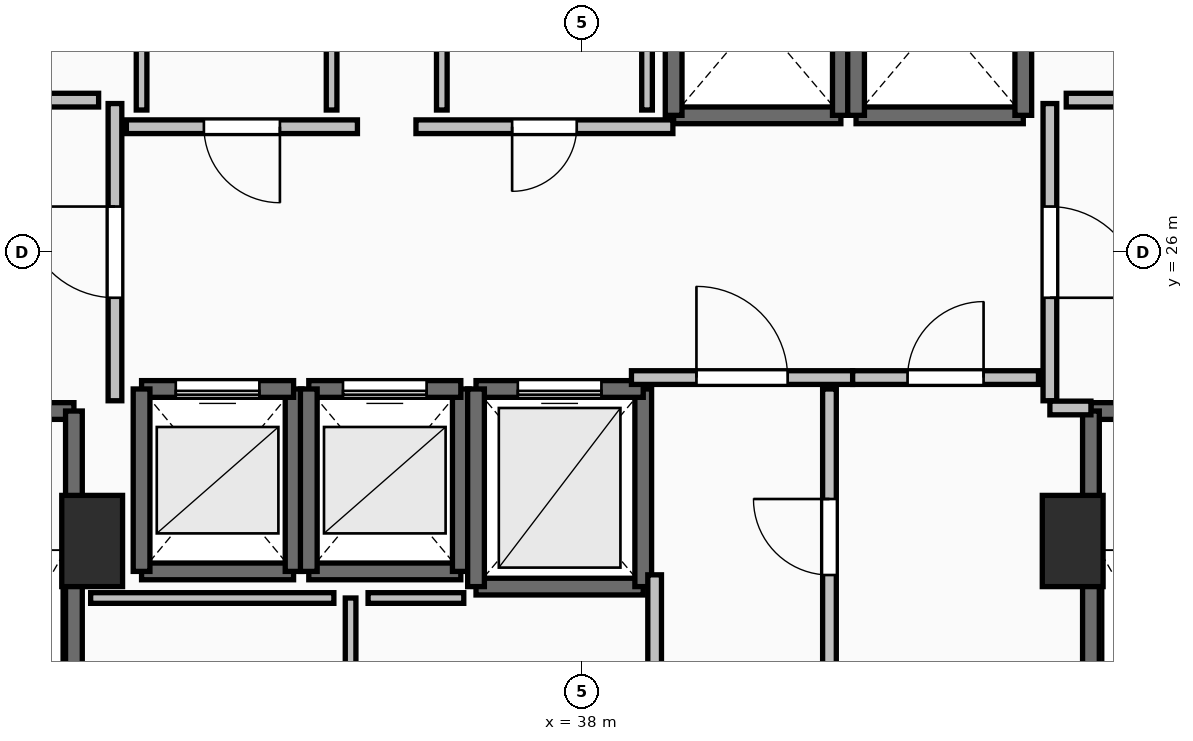
"""IFC4 building model, lengths in metres.
Left out: names, types, materials, properties, quantities, classifications, styles, units other than length and angle.
Written with IfcOpenShell. Run it as: python <this file> out.ifc"""

import sys

from ifc_helpers import new_model, si_unit, direction, frame, frame_2d, origin, origin_2d, place, context, subcontext, project, spatial, rectangle, extrude, element, fill, save


model = new_model("IFC4")
c1 = context("Model", 3, precision=1e-05, world=origin(), true_north=direction((0.0, 1.0)))
c2 = subcontext(c1, "Body", "Model", "MODEL_VIEW")
j1 = project(units=[si_unit("LENGTHUNIT", "METRE"), si_unit("PLANEANGLEUNIT", "RADIAN")], contexts=[c1])
p1 = place(None, origin())
s1 = spatial("IfcSite", under=j1, at=p1, CompositionType="ELEMENT")
p2 = place(p1, origin())
s2 = spatial("IfcBuilding", under=s1, at=p2, CompositionType="ELEMENT")
p3 = place(p2, frame((0.0, 0.0, 157.1)))
s3 = spatial("IfcBuildingStorey", under=s2, at=p3, CompositionType="ELEMENT", Elevation=157.1)
for number, where, z_axis, x_axis in (
    (1, (31.55, 22.2, 0.0), (0.0, 0.0, 1.0), (1.0, 0.0, 0.0)),
    (2, (44.45, 22.2, 0.0), (0.0, 0.0, 1.0), (1.0, 0.0, 0.0)),
):
    element("IfcColumn", number, at=place(p3, frame(where, z_axis=z_axis, x_axis=x_axis)), inside=s3, PredefinedType="PILASTER", context=c2, shape_type="SweptSolid", body=[
        extrude(rectangle(XDim=0.8, YDim=1.2, at=origin_2d()), origin(), (0.0, 0.0, 1.0), 3.5),
    ])
p4 = place(p3, frame((27.94, 23.91, 0.0), z_axis=(0.0, 0.0, 1.0), x_axis=(1.0, 0.0, 0.0)))
e3 = element("IfcWall", 3, at=p4, inside=s3, PredefinedType="SOLIDWALL", context=c2, shape_type="SweptSolid", body=[
    extrude(rectangle(XDim=3.37, YDim=0.22, at=frame_2d((1.685, 0.0))), origin(), (0.0, 0.0, 1.0), 3.24),
])
p5 = place(p4, frame((1.135, 0.0, 0.0)))
e4 = element("IfcOpeningElement", 4, at=p5, cuts=e3, PredefinedType="OPENING", context=c2, shape_type="SweptSolid", body=[
    extrude(rectangle(XDim=1.1, YDim=2.15, at=frame_2d((0.55, 1.075))), frame((0.0, 0.125, 0.0), z_axis=(0.0, -1.0, 0.0), x_axis=(1.0, 0.0, 0.0)), (0.0, 0.0, 1.0), 0.25),
])
p6 = place(p3, frame((31.31, 23.91, 0.0), z_axis=(0.0, 0.0, 1.0), x_axis=(0.0, -1.0, 0.0)))
e5 = element("IfcWall", 5, at=p6, inside=s3, PredefinedType="SOLIDWALL", context=c2, shape_type="SweptSolid", body=[
    extrude(rectangle(XDim=7.42, YDim=0.22, at=frame_2d((3.71, 0.0))), origin(), (0.0, 0.0, 1.0), 3.24),
])
p7 = place(p3, frame((44.69, 23.91, 0.0), z_axis=(0.0, 0.0, 1.0), x_axis=(1.0, 0.0, 0.0)))
e6 = element("IfcWall", 6, at=p7, inside=s3, PredefinedType="SOLIDWALL", context=c2, shape_type="SweptSolid", body=[
    extrude(rectangle(XDim=3.37, YDim=0.22, at=frame_2d((1.685, 0.0))), origin(), (0.0, 0.0, 1.0), 3.24),
])
p8 = place(p7, frame((1.135, 0.0, 0.0)))
e7 = element("IfcOpeningElement", 7, at=p8, cuts=e6, PredefinedType="OPENING", context=c2, shape_type="SweptSolid", body=[
    extrude(rectangle(XDim=1.1, YDim=2.15, at=frame_2d((0.55, 1.075))), frame((0.0, 0.125, 0.0), z_axis=(0.0, -1.0, 0.0), x_axis=(1.0, 0.0, 0.0)), (0.0, 0.0, 1.0), 0.25),
])
p9 = place(p3, frame((44.69, 16.49, 0.0), z_axis=(0.0, 0.0, 1.0), x_axis=(0.0, 1.0, 0.0)))
e8 = element("IfcWall", 8, at=p9, inside=s3, PredefinedType="SOLIDWALL", context=c2, shape_type="SweptSolid", body=[
    extrude(rectangle(XDim=7.42, YDim=0.22, at=frame_2d((3.71, 0.0))), origin(), (0.0, 0.0, 1.0), 3.24),
])
p10 = place(p3, frame((32.2, 21.8, 0.0), z_axis=(0.0, 0.0, 1.0), x_axis=(1.0, 0.0, 0.0)))
e9 = element("IfcWall", 9, at=p10, inside=s3, PredefinedType="SOLIDWALL", context=c2, shape_type="SweptSolid", body=[
    extrude(rectangle(XDim=2.0, YDim=0.22, at=frame_2d((1.0, 0.0))), origin(), (0.0, 0.0, 1.0), 3.24),
])
p11 = place(p3, frame((34.2, 21.8, 0.0), z_axis=(0.0, 0.0, 1.0), x_axis=(0.0, 1.0, 0.0)))
e10 = element("IfcWall", 10, at=p11, inside=s3, PredefinedType="SOLIDWALL", context=c2, shape_type="SweptSolid", body=[
    extrude(rectangle(XDim=2.4, YDim=0.22, at=frame_2d((1.2, 0.0))), origin(), (0.0, 0.0, 1.0), 3.24),
])
p12 = place(p3, frame((34.2, 24.2, 0.0), z_axis=(0.0, 0.0, 1.0), x_axis=(-1.0, 0.0, 0.0)))
e11 = element("IfcWall", 11, at=p12, inside=s3, PredefinedType="SOLIDWALL", context=c2, shape_type="SweptSolid", body=[
    extrude(rectangle(XDim=2.0, YDim=0.22, at=frame_2d((1.0, 0.0))), origin(), (0.0, 0.0, 1.0), 3.24),
])
p13 = place(p12, frame((0.45, 0.0, 0.0)))
e12 = element("IfcOpeningElement", 12, at=p13, cuts=e11, PredefinedType="OPENING", context=c2, shape_type="SweptSolid", body=[
    extrude(rectangle(XDim=1.1, YDim=2.2, at=frame_2d((0.55, 1.1))), frame((0.0, 0.125, 0.0), z_axis=(0.0, -1.0, 0.0), x_axis=(1.0, 0.0, 0.0)), (0.0, 0.0, 1.0), 0.25),
])
p14 = place(p3, frame((32.2, 24.2, 0.0), z_axis=(0.0, 0.0, 1.0), x_axis=(0.0, -1.0, 0.0)))
e13 = element("IfcWall", 13, at=p14, inside=s3, PredefinedType="SOLIDWALL", context=c2, shape_type="SweptSolid", body=[
    extrude(rectangle(XDim=2.4, YDim=0.22, at=frame_2d((1.2, 0.0))), origin(), (0.0, 0.0, 1.0), 3.24),
])
p15 = place(p3, frame((34.4, 21.8, 0.0), z_axis=(0.0, 0.0, 1.0), x_axis=(1.0, 0.0, 0.0)))
e14 = element("IfcWall", 14, at=p15, inside=s3, PredefinedType="SOLIDWALL", context=c2, shape_type="SweptSolid", body=[
    extrude(rectangle(XDim=2.0, YDim=0.22, at=frame_2d((1.0, 0.0))), origin(), (0.0, 0.0, 1.0), 3.24),
])
p16 = place(p3, frame((36.4, 21.8, 0.0), z_axis=(0.0, 0.0, 1.0), x_axis=(0.0, 1.0, 0.0)))
e15 = element("IfcWall", 15, at=p16, inside=s3, PredefinedType="SOLIDWALL", context=c2, shape_type="SweptSolid", body=[
    extrude(rectangle(XDim=2.4, YDim=0.22, at=frame_2d((1.2, 0.0))), origin(), (0.0, 0.0, 1.0), 3.24),
])
p17 = place(p3, frame((36.4, 24.2, 0.0), z_axis=(0.0, 0.0, 1.0), x_axis=(-1.0, 0.0, 0.0)))
e16 = element("IfcWall", 16, at=p17, inside=s3, PredefinedType="SOLIDWALL", context=c2, shape_type="SweptSolid", body=[
    extrude(rectangle(XDim=2.0, YDim=0.22, at=frame_2d((1.0, 0.0))), origin(), (0.0, 0.0, 1.0), 3.24),
])
p18 = place(p17, frame((0.45, 0.0, 0.0)))
e17 = element("IfcOpeningElement", 17, at=p18, cuts=e16, PredefinedType="OPENING", context=c2, shape_type="SweptSolid", body=[
    extrude(rectangle(XDim=1.1, YDim=2.2, at=frame_2d((0.55, 1.1))), frame((0.0, 0.125, 0.0), z_axis=(0.0, -1.0, 0.0), x_axis=(1.0, 0.0, 0.0)), (0.0, 0.0, 1.0), 0.25),
])
p19 = place(p3, frame((34.4, 24.2, 0.0), z_axis=(0.0, 0.0, 1.0), x_axis=(0.0, -1.0, 0.0)))
e18 = element("IfcWall", 18, at=p19, inside=s3, PredefinedType="SOLIDWALL", context=c2, shape_type="SweptSolid", body=[
    extrude(rectangle(XDim=2.4, YDim=0.22, at=frame_2d((1.2, 0.0))), origin(), (0.0, 0.0, 1.0), 3.24),
])
p20 = place(p3, frame((36.6, 21.6, 0.0), z_axis=(0.0, 0.0, 1.0), x_axis=(1.0, 0.0, 0.0)))
e19 = element("IfcWall", 19, at=p20, inside=s3, PredefinedType="SOLIDWALL", context=c2, shape_type="SweptSolid", body=[
    extrude(rectangle(XDim=2.2, YDim=0.22, at=frame_2d((1.1, 0.0))), origin(), (0.0, 0.0, 1.0), 3.24),
])
p21 = place(p3, frame((38.8, 21.6, 0.0), z_axis=(0.0, 0.0, 1.0), x_axis=(0.0, 1.0, 0.0)))
e20 = element("IfcWall", 20, at=p21, inside=s3, PredefinedType="SOLIDWALL", context=c2, shape_type="SweptSolid", body=[
    extrude(rectangle(XDim=2.6, YDim=0.22, at=frame_2d((1.3, 0.0))), origin(), (0.0, 0.0, 1.0), 3.24),
])
p22 = place(p3, frame((38.8, 24.2, 0.0), z_axis=(0.0, 0.0, 1.0), x_axis=(-1.0, 0.0, 0.0)))
e21 = element("IfcWall", 21, at=p22, inside=s3, PredefinedType="SOLIDWALL", context=c2, shape_type="SweptSolid", body=[
    extrude(rectangle(XDim=2.2, YDim=0.22, at=frame_2d((1.1, 0.0))), origin(), (0.0, 0.0, 1.0), 3.24),
])
p23 = place(p22, frame((0.55, 0.0, 0.0)))
e22 = element("IfcOpeningElement", 22, at=p23, cuts=e21, PredefinedType="OPENING", context=c2, shape_type="SweptSolid", body=[
    extrude(rectangle(XDim=1.1, YDim=2.2, at=frame_2d((0.55, 1.1))), frame((0.0, 0.125, 0.0), z_axis=(0.0, -1.0, 0.0), x_axis=(1.0, 0.0, 0.0)), (0.0, 0.0, 1.0), 0.25),
])
p24 = place(p3, frame((36.6, 24.2, 0.0), z_axis=(0.0, 0.0, 1.0), x_axis=(0.0, -1.0, 0.0)))
e23 = element("IfcWall", 23, at=p24, inside=s3, PredefinedType="SOLIDWALL", context=c2, shape_type="SweptSolid", body=[
    extrude(rectangle(XDim=2.6, YDim=0.22, at=frame_2d((1.3, 0.0))), origin(), (0.0, 0.0, 1.0), 3.24),
])
p25 = place(p3, frame((39.2, 27.8, 0.0), z_axis=(0.0, 0.0, 1.0), x_axis=(1.0, 0.0, 0.0)))
e24 = element("IfcWall", 24, at=p25, inside=s3, PredefinedType="SOLIDWALL", context=c2, shape_type="SweptSolid", body=[
    extrude(rectangle(XDim=2.2, YDim=0.22, at=frame_2d((1.1, 0.0))), origin(), (0.0, 0.0, 1.0), 3.24),
])
for number, where, z_axis, x_axis in (
    (25, (41.4, 27.8, 0.0), (0.0, 0.0, 1.0), (0.0, 1.0, 0.0)),
    (26, (39.2, 30.4, 0.0), (0.0, 0.0, 1.0), (0.0, -1.0, 0.0)),
):
    element("IfcWall", number, at=place(p3, frame(where, z_axis=z_axis, x_axis=x_axis)), inside=s3, PredefinedType="SOLIDWALL", context=c2, shape_type="SweptSolid", body=[
        extrude(rectangle(XDim=2.6, YDim=0.22, at=frame_2d((1.3, 0.0))), origin(), (0.0, 0.0, 1.0), 3.24),
    ])
p26 = place(p3, frame((41.6, 27.8, 0.0), z_axis=(0.0, 0.0, 1.0), x_axis=(1.0, 0.0, 0.0)))
e27 = element("IfcWall", 27, at=p26, inside=s3, PredefinedType="SOLIDWALL", context=c2, shape_type="SweptSolid", body=[
    extrude(rectangle(XDim=2.2, YDim=0.22, at=frame_2d((1.1, 0.0))), origin(), (0.0, 0.0, 1.0), 3.24),
])
for number, where, z_axis, x_axis in (
    (28, (43.8, 27.8, 0.0), (0.0, 0.0, 1.0), (0.0, 1.0, 0.0)),
    (29, (41.6, 30.4, 0.0), (0.0, 0.0, 1.0), (0.0, -1.0, 0.0)),
):
    element("IfcWall", number, at=place(p3, frame(where, z_axis=z_axis, x_axis=x_axis)), inside=s3, PredefinedType="SOLIDWALL", context=c2, shape_type="SweptSolid", body=[
        extrude(rectangle(XDim=2.6, YDim=0.22, at=frame_2d((1.3, 0.0))), origin(), (0.0, 0.0, 1.0), 3.24),
    ])
p27 = place(p3, frame((31.85, 24.045, 0.0), z_axis=(0.0, 0.0, 1.0), x_axis=(0.0, 1.0, 0.0)))
e30 = element("IfcWall", 30, at=p27, inside=s3, PredefinedType="PARTITIONING", context=c2, shape_type="SweptSolid", body=[
    extrude(rectangle(XDim=3.91, YDim=0.18, at=frame_2d((1.955, 0.0))), origin(), (0.0, 0.0, 1.0), 3.24),
])
p28 = place(p27, frame((1.355, 0.0, 0.0)))
e31 = element("IfcOpeningElement", 31, at=p28, cuts=e30, PredefinedType="OPENING", context=c2, shape_type="SweptSolid", body=[
    extrude(rectangle(XDim=1.2, YDim=2.15, at=frame_2d((0.6, 1.075))), frame((0.0, 0.105, 0.0), z_axis=(0.0, -1.0, 0.0), x_axis=(1.0, 0.0, 0.0)), (0.0, 0.0, 1.0), 0.21),
])
p29 = place(p3, frame((44.15, 27.955, 0.0), z_axis=(0.0, 0.0, 1.0), x_axis=(0.0, -1.0, 0.0)))
e32 = element("IfcWall", 32, at=p29, inside=s3, PredefinedType="PARTITIONING", context=c2, shape_type="SweptSolid", body=[
    extrude(rectangle(XDim=3.91, YDim=0.18, at=frame_2d((1.955, 0.0))), origin(), (0.0, 0.0, 1.0), 3.24),
])
p30 = place(p29, frame((1.355, 0.0, 0.0)))
e33 = element("IfcOpeningElement", 33, at=p30, cuts=e32, PredefinedType="OPENING", context=c2, shape_type="SweptSolid", body=[
    extrude(rectangle(XDim=1.2, YDim=2.15, at=frame_2d((0.6, 1.075))), frame((0.0, 0.105, 0.0), z_axis=(0.0, -1.0, 0.0), x_axis=(1.0, 0.0, 0.0)), (0.0, 0.0, 1.0), 0.21),
])
p31 = place(p3, frame((44.15, 23.95, 0.0), z_axis=(0.0, 0.0, 1.0), x_axis=(1.0, 0.0, 0.0)))
e34 = element("IfcWall", 34, at=p31, inside=s3, PredefinedType="PARTITIONING", context=c2, shape_type="SweptSolid", body=[
    extrude(rectangle(XDim=0.54, YDim=0.18, at=frame_2d((0.27, 0.0))), origin(), (0.0, 0.0, 1.0), 3.24),
])
p32 = place(p3, frame((38.645, 24.35, 0.0), z_axis=(0.0, 0.0, 1.0), x_axis=(1.0, 0.0, 0.0)))
e35 = element("IfcWall", 35, at=p32, inside=s3, PredefinedType="PARTITIONING", context=c2, shape_type="SweptSolid", body=[
    extrude(rectangle(XDim=2.91, YDim=0.18, at=frame_2d((1.455, 0.0))), origin(), (0.0, 0.0, 1.0), 3.24),
])
p33 = place(p32, frame((0.855, 0.0, 0.0)))
e36 = element("IfcOpeningElement", 36, at=p33, cuts=e35, PredefinedType="OPENING", context=c2, shape_type="SweptSolid", body=[
    extrude(rectangle(XDim=1.2, YDim=2.15, at=frame_2d((0.6, 1.075))), frame((0.0, 0.105, 0.0), z_axis=(0.0, -1.0, 0.0), x_axis=(1.0, 0.0, 0.0)), (0.0, 0.0, 1.0), 0.21),
])
p34 = place(p3, frame((41.555, 24.35, 0.0), z_axis=(0.0, 0.0, 1.0), x_axis=(1.0, 0.0, 0.0)))
e37 = element("IfcWall", 37, at=p34, inside=s3, PredefinedType="PARTITIONING", context=c2, shape_type="SweptSolid", body=[
    extrude(rectangle(XDim=2.445, YDim=0.18, at=frame_2d((1.223, 0.0))), origin(), (0.0, 0.0, 1.0), 3.24),
])
p35 = place(p34, frame((0.722, 0.0, 0.0)))
e38 = element("IfcOpeningElement", 38, at=p35, cuts=e37, PredefinedType="OPENING", context=c2, shape_type="SweptSolid", body=[
    extrude(rectangle(XDim=1.0, YDim=2.15, at=frame_2d((0.5, 1.075))), frame((0.0, 0.105, 0.0), z_axis=(0.0, -1.0, 0.0), x_axis=(1.0, 0.0, 0.0)), (0.0, 0.0, 1.0), 0.21),
])
p36 = place(p3, frame((35.04, 27.65, 0.0), z_axis=(0.0, 0.0, 1.0), x_axis=(-1.0, 0.0, 0.0)))
e39 = element("IfcWall", 39, at=p36, inside=s3, PredefinedType="PARTITIONING", context=c2, shape_type="SweptSolid", body=[
    extrude(rectangle(XDim=3.04, YDim=0.18, at=frame_2d((1.52, 0.0))), origin(), (0.0, 0.0, 1.0), 3.24),
])
p37 = place(p36, frame((1.02, 0.0, 0.0)))
e40 = element("IfcOpeningElement", 40, at=p37, cuts=e39, PredefinedType="OPENING", context=c2, shape_type="SweptSolid", body=[
    extrude(rectangle(XDim=1.0, YDim=2.15, at=frame_2d((0.5, 1.075))), frame((0.0, 0.105, 0.0), z_axis=(0.0, -1.0, 0.0), x_axis=(1.0, 0.0, 0.0)), (0.0, 0.0, 1.0), 0.21),
])
p38 = place(p3, frame((39.19, 27.65, 0.0), z_axis=(0.0, 0.0, 1.0), x_axis=(-1.0, 0.0, 0.0)))
e41 = element("IfcWall", 41, at=p38, inside=s3, PredefinedType="PARTITIONING", context=c2, shape_type="SweptSolid", body=[
    extrude(rectangle(XDim=3.38, YDim=0.18, at=frame_2d((1.69, 0.0))), origin(), (0.0, 0.0, 1.0), 3.24),
])
p39 = place(p38, frame((1.265, 0.0, 0.0)))
e42 = element("IfcOpeningElement", 42, at=p39, cuts=e41, PredefinedType="OPENING", context=c2, shape_type="SweptSolid", body=[
    extrude(rectangle(XDim=0.85, YDim=2.1, at=frame_2d((0.425, 1.05))), frame((0.0, 0.105, 0.0), z_axis=(0.0, -1.0, 0.0), x_axis=(1.0, 0.0, 0.0)), (0.0, 0.0, 1.0), 0.21),
])
p40 = place(p3, frame((41.25, 20.305, 0.0), z_axis=(0.0, 0.0, 1.0), x_axis=(0.0, 1.0, 0.0)))
e43 = element("IfcWall", 43, at=p40, inside=s3, PredefinedType="PARTITIONING", context=c2, shape_type="SweptSolid", body=[
    extrude(rectangle(XDim=3.895, YDim=0.18, at=frame_2d((1.948, 0.0))), origin(), (0.0, 0.0, 1.0), 3.24),
])
p41 = place(p40, frame((1.448, 0.0, 0.0)))
e44 = element("IfcOpeningElement", 44, at=p41, cuts=e43, PredefinedType="OPENING", context=c2, shape_type="SweptSolid", body=[
    extrude(rectangle(XDim=1.0, YDim=2.15, at=frame_2d((0.5, 1.075))), frame((0.0, 0.105, 0.0), z_axis=(0.0, -1.0, 0.0), x_axis=(1.0, 0.0, 0.0)), (0.0, 0.0, 1.0), 0.21),
])
p42 = place(p3, frame((38.95, 21.755, 0.0), z_axis=(0.0, 0.0, 1.0), x_axis=(0.0, -1.0, 0.0)))
e45 = element("IfcWall", 45, at=p42, inside=s3, PredefinedType="PARTITIONING", context=c2, shape_type="SweptSolid", body=[
    extrude(rectangle(XDim=5.435, YDim=0.18, at=frame_2d((2.717, 0.0))), origin(), (0.0, 0.0, 1.0), 3.24),
])
p43 = place(p42, frame((2.218, 0.0, 0.0)))
e46 = element("IfcOpeningElement", 46, at=p43, cuts=e45, PredefinedType="OPENING", context=c2, shape_type="SweptSolid", body=[
    extrude(rectangle(XDim=1.0, YDim=2.15, at=frame_2d((0.5, 1.075))), frame((0.0, 0.105, 0.0), z_axis=(0.0, -1.0, 0.0), x_axis=(1.0, 0.0, 0.0)), (0.0, 0.0, 1.0), 0.21),
])
p44 = place(p3, frame((34.95, 16.32, 0.0), z_axis=(0.0, 0.0, 1.0), x_axis=(0.0, 1.0, 0.0)))
e47 = element("IfcWall", 47, at=p44, inside=s3, PredefinedType="PARTITIONING", context=c2, shape_type="SweptSolid", body=[
    extrude(rectangle(XDim=5.13, YDim=0.14, at=frame_2d((2.565, 0.0))), origin(), (0.0, 0.0, 1.0), 3.24),
])
for number, where, z_axis, x_axis in (
    (48, (31.635, 28.0, 0.0), (0.0, 0.0, 1.0), (-1.0, 0.0, 0.0)),
    (49, (45.28, 28.0, 0.0), (0.0, 0.0, 1.0), (-1.0, 0.0, 0.0)),
):
    element("IfcWall", number, at=place(p3, frame(where, z_axis=z_axis, x_axis=x_axis)), inside=s3, PredefinedType="PARTITIONING", context=c2, shape_type="SweptSolid", body=[
        extrude(rectangle(XDim=0.915, YDim=0.18, at=frame_2d((0.458, 0.0))), origin(), (0.0, 0.0, 1.0), 3.24),
    ])
p45 = place(p3, frame((34.73, 21.45, 0.0), z_axis=(0.0, 0.0, 1.0), x_axis=(-1.0, 0.0, 0.0)))
e50 = element("IfcWall", 50, at=p45, inside=s3, PredefinedType="PARTITIONING", context=c2, shape_type="SweptSolid", body=[
    extrude(rectangle(XDim=3.2, YDim=0.14, at=frame_2d((1.6, 0.0))), origin(), (0.0, 0.0, 1.0), 3.24),
])
p46 = place(p3, frame((36.439, 21.45, 0.0), z_axis=(0.0, 0.0, 1.0), x_axis=(-1.0, 0.0, 0.0)))
e51 = element("IfcWall", 51, at=p46, inside=s3, PredefinedType="PARTITIONING", context=c2, shape_type="SweptSolid", body=[
    extrude(rectangle(XDim=1.259, YDim=0.14, at=frame_2d((0.629, 0.0))), origin(), (0.0, 0.0, 1.0), 3.24),
])
for number, where, z_axis, x_axis in (
    (52, (32.2, 30.26, 0.0), (0.0, 0.0, 1.0), (0.0, -1.0, 0.0)),
    (53, (34.7, 27.87, 0.0), (0.0, 0.0, 1.0), (0.0, 1.0, 0.0)),
    (54, (36.15, 30.26, 0.0), (0.0, 0.0, 1.0), (0.0, -1.0, 0.0)),
    (55, (38.85, 27.87, 0.0), (0.0, 0.0, 1.0), (0.0, 1.0, 0.0)),
):
    element("IfcWall", number, at=place(p3, frame(where, z_axis=z_axis, x_axis=x_axis)), inside=s3, PredefinedType="PARTITIONING", context=c2, shape_type="SweptSolid", body=[
        extrude(rectangle(XDim=2.39, YDim=0.14, at=frame_2d((1.195, 0.0))), origin(), (0.0, 0.0, 1.0), 3.24),
    ])
p47 = place(p13, origin())
e56 = element("IfcDoor", 56, at=p47, inside=s3, OperationType="SLIDING_TO_LEFT", PredefinedType="DOOR", context=c2, shape_type="SweptSolid", body=[
    extrude(rectangle(XDim=1.1, YDim=2.2, at=frame_2d((0.55, 1.1))), frame((0.0, 0.025, 0.0), z_axis=(0.0, -1.0, 0.0), x_axis=(1.0, 0.0, 0.0)), (0.0, 0.0, 1.0), 0.05),
])
fill(e12, e56)
p48 = place(p18, origin())
e57 = element("IfcDoor", 57, at=p48, inside=s3, OperationType="SLIDING_TO_LEFT", PredefinedType="DOOR", context=c2, shape_type="SweptSolid", body=[
    extrude(rectangle(XDim=1.1, YDim=2.2, at=frame_2d((0.55, 1.1))), frame((0.0, 0.025, 0.0), z_axis=(0.0, -1.0, 0.0), x_axis=(1.0, 0.0, 0.0)), (0.0, 0.0, 1.0), 0.05),
])
fill(e17, e57)
p49 = place(p23, origin())
e58 = element("IfcDoor", 58, at=p49, inside=s3, OperationType="SLIDING_TO_LEFT", PredefinedType="DOOR", context=c2, shape_type="SweptSolid", body=[
    extrude(rectangle(XDim=1.1, YDim=2.2, at=frame_2d((0.55, 1.1))), frame((0.0, 0.025, 0.0), z_axis=(0.0, -1.0, 0.0), x_axis=(1.0, 0.0, 0.0)), (0.0, 0.0, 1.0), 0.05),
])
fill(e22, e58)
p50 = place(p28, origin())
e59 = element("IfcDoor", 59, at=p50, inside=s3, OperationType="SINGLE_SWING_RIGHT", PredefinedType="DOOR", context=c2, shape_type="SweptSolid", body=[
    extrude(rectangle(XDim=1.2, YDim=2.15, at=frame_2d((0.6, 1.075))), frame((0.0, 0.025, 0.0), z_axis=(0.0, -1.0, 0.0), x_axis=(1.0, 0.0, 0.0)), (0.0, 0.0, 1.0), 0.05),
])
fill(e31, e59)
p51 = place(p30, origin())
e60 = element("IfcDoor", 60, at=p51, inside=s3, OperationType="SINGLE_SWING_RIGHT", PredefinedType="DOOR", context=c2, shape_type="SweptSolid", body=[
    extrude(rectangle(XDim=1.2, YDim=2.15, at=frame_2d((0.6, 1.075))), frame((0.0, 0.025, 0.0), z_axis=(0.0, -1.0, 0.0), x_axis=(1.0, 0.0, 0.0)), (0.0, 0.0, 1.0), 0.05),
])
fill(e33, e60)
p52 = place(p33, origin())
e61 = element("IfcDoor", 61, at=p52, inside=s3, OperationType="SINGLE_SWING_LEFT", PredefinedType="DOOR", context=c2, shape_type="SweptSolid", body=[
    extrude(rectangle(XDim=1.2, YDim=2.15, at=frame_2d((0.6, 1.075))), frame((0.0, 0.025, 0.0), z_axis=(0.0, -1.0, 0.0), x_axis=(1.0, 0.0, 0.0)), (0.0, 0.0, 1.0), 0.05),
])
fill(e36, e61)
p53 = place(p35, origin())
e62 = element("IfcDoor", 62, at=p53, inside=s3, OperationType="SINGLE_SWING_RIGHT", PredefinedType="DOOR", context=c2, shape_type="SweptSolid", body=[
    extrude(rectangle(XDim=1.0, YDim=2.15, at=frame_2d((0.5, 1.075))), frame((0.0, 0.025, 0.0), z_axis=(0.0, -1.0, 0.0), x_axis=(1.0, 0.0, 0.0)), (0.0, 0.0, 1.0), 0.05),
])
fill(e38, e62)
p54 = place(p37, origin())
e63 = element("IfcDoor", 63, at=p54, inside=s3, OperationType="SINGLE_SWING_LEFT", PredefinedType="DOOR", context=c2, shape_type="SweptSolid", body=[
    extrude(rectangle(XDim=1.0, YDim=2.15, at=frame_2d((0.5, 1.075))), frame((0.0, 0.025, 0.0), z_axis=(0.0, -1.0, 0.0), x_axis=(1.0, 0.0, 0.0)), (0.0, 0.0, 1.0), 0.05),
])
fill(e40, e63)
p55 = place(p39, origin())
e64 = element("IfcDoor", 64, at=p55, inside=s3, OperationType="SINGLE_SWING_RIGHT", PredefinedType="DOOR", context=c2, shape_type="SweptSolid", body=[
    extrude(rectangle(XDim=0.85, YDim=2.1, at=frame_2d((0.425, 1.05))), frame((0.0, 0.025, 0.0), z_axis=(0.0, -1.0, 0.0), x_axis=(1.0, 0.0, 0.0)), (0.0, 0.0, 1.0), 0.05),
])
fill(e42, e64)
p56 = place(p41, origin())
e65 = element("IfcDoor", 65, at=p56, inside=s3, OperationType="SINGLE_SWING_RIGHT", PredefinedType="DOOR", context=c2, shape_type="SweptSolid", body=[
    extrude(rectangle(XDim=1.0, YDim=2.15, at=frame_2d((0.5, 1.075))), frame((0.0, 0.025, 0.0), z_axis=(0.0, -1.0, 0.0), x_axis=(1.0, 0.0, 0.0)), (0.0, 0.0, 1.0), 0.05),
])
fill(e44, e65)
save(model, sys.argv[1])
